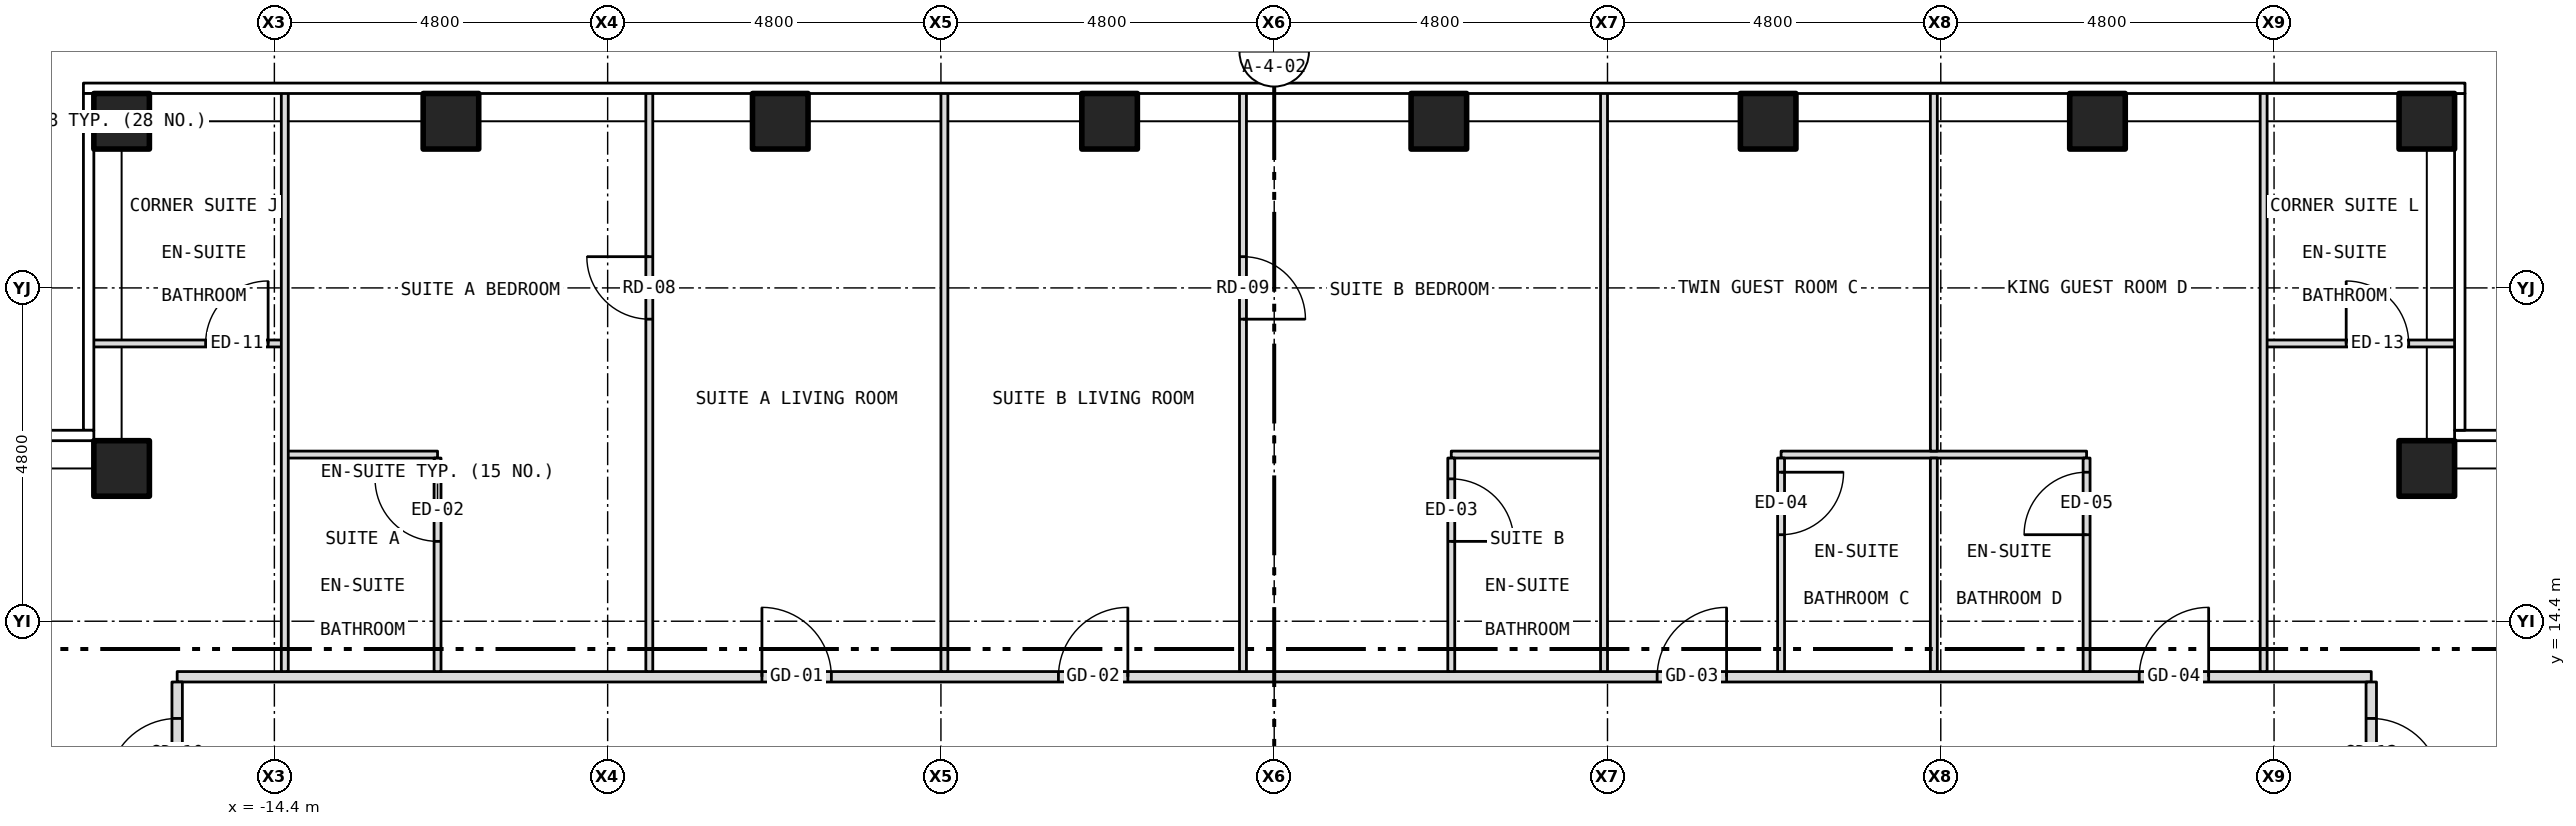
"""IFC4 building model, lengths in metres.
Left out: names, types, materials, properties, quantities, classifications, styles, units other than length and angle.
Written with IfcOpenShell. Run it as: python <this file> out.ifc"""

import sys

from ifc_helpers import new_model, si_unit, direction, frame, frame_2d, origin, origin_2d, place, context, subcontext, project, spatial, rectangle, hollow_rectangle, extrude, element, fill, save


model = new_model("IFC4")
c1 = context("Model", 3, precision=1e-05, world=origin(), true_north=direction((0.0, 1.0)))
c2 = subcontext(c1, "Body", "Model", "MODEL_VIEW")
j1 = project(units=[si_unit("LENGTHUNIT", "METRE"), si_unit("PLANEANGLEUNIT", "RADIAN")], contexts=[c1])
p1 = place(None, origin())
s1 = spatial("IfcSite", under=j1, at=p1, CompositionType="ELEMENT")
p2 = place(p1, origin())
s2 = spatial("IfcBuilding", under=s1, at=p2, CompositionType="ELEMENT")
p3 = place(p2, frame((0.0, 0.0, 155.0)))
s3 = spatial("IfcBuildingStorey", under=s2, at=p3, CompositionType="ELEMENT", Elevation=155.0)
for number, where, z_axis, x_axis in (
    (1, (-16.6, 21.6, -0.15), (0.0, 0.0, 1.0), (1.0, 0.0, 0.0)),
    (2, (-11.857, 21.6, -0.15), (0.0, 0.0, 1.0), (1.0, 0.0, 0.0)),
    (3, (-7.114, 21.6, -0.15), (0.0, 0.0, 1.0), (1.0, 0.0, 0.0)),
    (4, (-2.371, 21.6, -0.15), (0.0, 0.0, 1.0), (1.0, 0.0, 0.0)),
    (5, (2.371, 21.6, -0.15), (0.0, 0.0, 1.0), (1.0, 0.0, 0.0)),
    (6, (7.114, 21.6, -0.15), (0.0, 0.0, 1.0), (1.0, 0.0, 0.0)),
    (7, (11.857, 21.6, -0.15), (0.0, 0.0, 1.0), (1.0, 0.0, 0.0)),
    (8, (16.6, 21.6, -0.15), (0.0, 0.0, 1.0), (1.0, 0.0, 0.0)),
    (9, (-16.6, 16.6, -0.15), (0.0, 0.0, 1.0), (1.0, 0.0, 0.0)),
    (10, (16.6, 16.6, -0.15), (0.0, 0.0, 1.0), (1.0, 0.0, 0.0)),
):
    element("IfcColumn", number, at=place(p3, frame(where, z_axis=z_axis, x_axis=x_axis)), inside=s3, PredefinedType="COLUMN", context=c2, shape_type="SweptSolid", body=[
        extrude(hollow_rectangle(XDim=0.8, YDim=0.8, WallThickness=0.045, at=origin_2d()), origin(), (0.0, 0.0, 1.0), 3.5),
    ])
p4 = place(p3, frame((-15.8, 13.6, 0.0), z_axis=(0.0, 0.0, 1.0), x_axis=(1.0, 0.0, 0.0)))
e11 = element("IfcWall", 11, at=p4, inside=s3, PredefinedType="PARTITIONING", context=c2, shape_type="SweptSolid", body=[
    extrude(rectangle(XDim=31.6, YDim=0.15, at=frame_2d((15.8, 0.0))), origin(), (0.0, 0.0, 1.0), 3.35),
])
p5 = place(p4, frame((8.422, 0.0, 0.0)))
e12 = element("IfcOpeningElement", 12, at=p5, cuts=e11, PredefinedType="OPENING", context=c2, shape_type="SweptSolid", body=[
    extrude(rectangle(XDim=1.0, YDim=2.1, at=frame_2d((0.5, 1.05))), frame((0.0, 0.087, 0.0), z_axis=(0.0, -1.0, 0.0), x_axis=(1.0, 0.0, 0.0)), (0.0, 0.0, 1.0), 0.174),
])
p6 = place(p4, frame((12.692, 0.0, 0.0)))
e13 = element("IfcOpeningElement", 13, at=p6, cuts=e11, PredefinedType="OPENING", context=c2, shape_type="SweptSolid", body=[
    extrude(rectangle(XDim=1.0, YDim=2.1, at=frame_2d((0.5, 1.05))), frame((0.0, 0.087, 0.0), z_axis=(0.0, -1.0, 0.0), x_axis=(1.0, 0.0, 0.0)), (0.0, 0.0, 1.0), 0.174),
])
p7 = place(p4, frame((21.315, 0.0, 0.0)))
e14 = element("IfcOpeningElement", 14, at=p7, cuts=e11, PredefinedType="OPENING", context=c2, shape_type="SweptSolid", body=[
    extrude(rectangle(XDim=1.0, YDim=2.1, at=frame_2d((0.5, 1.05))), frame((0.0, 0.087, 0.0), z_axis=(0.0, -1.0, 0.0), x_axis=(1.0, 0.0, 0.0)), (0.0, 0.0, 1.0), 0.174),
])
p8 = place(p4, frame((28.258, 0.0, 0.0)))
e15 = element("IfcOpeningElement", 15, at=p8, cuts=e11, PredefinedType="OPENING", context=c2, shape_type="SweptSolid", body=[
    extrude(rectangle(XDim=1.0, YDim=2.1, at=frame_2d((0.5, 1.05))), frame((0.0, 0.087, 0.0), z_axis=(0.0, -1.0, 0.0), x_axis=(1.0, 0.0, 0.0)), (0.0, 0.0, 1.0), 0.174),
])
for number, where, z_axis, x_axis in (
    (16, (-14.25, 16.8, 0.0), (0.0, 0.0, 1.0), (1.0, 0.0, 0.0)),
    (17, (2.55, 16.8, 0.0), (0.0, 0.0, 1.0), (1.0, 0.0, 0.0)),
):
    element("IfcWall", number, at=place(p3, frame(where, z_axis=z_axis, x_axis=x_axis)), inside=s3, PredefinedType="PARTITIONING", context=c2, shape_type="SweptSolid", body=[
        extrude(rectangle(XDim=2.2, YDim=0.1, at=frame_2d((1.1, 0.0))), origin(), (0.0, 0.0, 1.0), 3.35),
    ])
p9 = place(p3, frame((7.3, 16.8, 0.0), z_axis=(0.0, 0.0, 1.0), x_axis=(1.0, 0.0, 0.0)))
e18 = element("IfcWall", 18, at=p9, inside=s3, PredefinedType="PARTITIONING", context=c2, shape_type="SweptSolid", body=[
    extrude(rectangle(XDim=4.4, YDim=0.1, at=frame_2d((2.2, 0.0))), origin(), (0.0, 0.0, 1.0), 3.35),
])
p10 = place(p3, frame((-17.03, 18.4, 0.0), z_axis=(0.0, 0.0, 1.0), x_axis=(1.0, 0.0, 0.0)))
e19 = element("IfcWall", 19, at=p10, inside=s3, PredefinedType="PARTITIONING", context=c2, shape_type="SweptSolid", body=[
    extrude(rectangle(XDim=2.78, YDim=0.1, at=frame_2d((1.39, 0.0))), origin(), (0.0, 0.0, 1.0), 3.35),
])
p11 = place(p10, frame((1.64, 0.0, 0.0)))
e20 = element("IfcOpeningElement", 20, at=p11, cuts=e19, PredefinedType="OPENING", context=c2, shape_type="SweptSolid", body=[
    extrude(rectangle(XDim=0.9, YDim=2.1, at=frame_2d((0.45, 1.05))), frame((0.0, 0.062, 0.0), z_axis=(0.0, -1.0, 0.0), x_axis=(1.0, 0.0, 0.0)), (0.0, 0.0, 1.0), 0.124),
])
p12 = place(p3, frame((14.25, 18.4, 0.0), z_axis=(0.0, 0.0, 1.0), x_axis=(1.0, 0.0, 0.0)))
e21 = element("IfcWall", 21, at=p12, inside=s3, PredefinedType="PARTITIONING", context=c2, shape_type="SweptSolid", body=[
    extrude(rectangle(XDim=2.78, YDim=0.1, at=frame_2d((1.39, 0.0))), origin(), (0.0, 0.0, 1.0), 3.35),
])
p13 = place(p12, frame((1.189, 0.0, 0.0)))
e22 = element("IfcOpeningElement", 22, at=p13, cuts=e21, PredefinedType="OPENING", context=c2, shape_type="SweptSolid", body=[
    extrude(rectangle(XDim=0.9, YDim=2.1, at=frame_2d((0.45, 1.05))), frame((0.0, 0.062, 0.0), z_axis=(0.0, -1.0, 0.0), x_axis=(1.0, 0.0, 0.0)), (0.0, 0.0, 1.0), 0.124),
])
p14 = place(p3, frame((-15.8, 10.92, 0.0), z_axis=(0.0, 0.0, 1.0), x_axis=(0.0, 1.0, 0.0)))
e23 = element("IfcWall", 23, at=p14, inside=s3, PredefinedType="PARTITIONING", context=c2, shape_type="SweptSolid", body=[
    extrude(rectangle(XDim=2.605, YDim=0.15, at=frame_2d((1.302, 0.0))), origin(), (0.0, 0.0, 1.0), 3.35),
])
p15 = place(p14, frame((1.08, 0.0, 0.0)))
e24 = element("IfcOpeningElement", 24, at=p15, cuts=e23, PredefinedType="OPENING", context=c2, shape_type="SweptSolid", body=[
    extrude(rectangle(XDim=1.0, YDim=2.1, at=frame_2d((0.5, 1.05))), frame((0.0, 0.087, 0.0), z_axis=(0.0, -1.0, 0.0), x_axis=(1.0, 0.0, 0.0)), (0.0, 0.0, 1.0), 0.174),
])
p16 = place(p3, frame((-14.25, 13.675, 0.0), z_axis=(0.0, 0.0, 1.0), x_axis=(0.0, 1.0, 0.0)))
e25 = element("IfcWall", 25, at=p16, inside=s3, PredefinedType="PARTITIONING", context=c2, shape_type="SweptSolid", body=[
    extrude(rectangle(XDim=8.355, YDim=0.1, at=frame_2d((4.177, 0.0))), origin(), (0.0, 0.0, 1.0), 2.817),
])
p17 = place(p3, frame((-12.05, 13.675, 0.0), z_axis=(0.0, 0.0, 1.0), x_axis=(0.0, 1.0, 0.0)))
e26 = element("IfcWall", 26, at=p17, inside=s3, PredefinedType="PARTITIONING", context=c2, shape_type="SweptSolid", body=[
    extrude(rectangle(XDim=3.075, YDim=0.1, at=frame_2d((1.538, 0.0))), origin(), (0.0, 0.0, 1.0), 3.35),
])
p18 = place(p17, frame((1.875, 0.0, 0.0)))
e27 = element("IfcOpeningElement", 27, at=p18, cuts=e26, PredefinedType="OPENING", context=c2, shape_type="SweptSolid", body=[
    extrude(rectangle(XDim=0.9, YDim=2.1, at=frame_2d((0.45, 1.05))), frame((0.0, 0.062, 0.0), z_axis=(0.0, -1.0, 0.0), x_axis=(1.0, 0.0, 0.0)), (0.0, 0.0, 1.0), 0.124),
])
p19 = place(p3, frame((-9.0, 13.675, 0.0), z_axis=(0.0, 0.0, 1.0), x_axis=(0.0, 1.0, 0.0)))
e28 = element("IfcWall", 28, at=p19, inside=s3, PredefinedType="PARTITIONING", context=c2, shape_type="SweptSolid", body=[
    extrude(rectangle(XDim=8.355, YDim=0.1, at=frame_2d((4.177, 0.0))), origin(), (0.0, 0.0, 1.0), 3.35),
])
p20 = place(p19, frame((5.075, 0.0, 0.0)))
e29 = element("IfcOpeningElement", 29, at=p20, cuts=e28, PredefinedType="OPENING", context=c2, shape_type="SweptSolid", body=[
    extrude(rectangle(XDim=0.9, YDim=2.1, at=frame_2d((0.45, 1.05))), frame((0.0, 0.062, 0.0), z_axis=(0.0, -1.0, 0.0), x_axis=(1.0, 0.0, 0.0)), (0.0, 0.0, 1.0), 0.124),
])
p21 = place(p3, frame((-4.75, 13.675, 0.0), z_axis=(0.0, 0.0, 1.0), x_axis=(0.0, 1.0, 0.0)))
e30 = element("IfcWall", 30, at=p21, inside=s3, PredefinedType="PARTITIONING", context=c2, shape_type="SweptSolid", body=[
    extrude(rectangle(XDim=8.355, YDim=0.1, at=frame_2d((4.177, 0.0))), origin(), (0.0, 0.0, 1.0), 2.817),
])
p22 = place(p3, frame((-0.45, 13.675, 0.0), z_axis=(0.0, 0.0, 1.0), x_axis=(0.0, 1.0, 0.0)))
e31 = element("IfcWall", 31, at=p22, inside=s3, PredefinedType="PARTITIONING", context=c2, shape_type="SweptSolid", body=[
    extrude(rectangle(XDim=8.355, YDim=0.1, at=frame_2d((4.177, 0.0))), origin(), (0.0, 0.0, 1.0), 3.35),
])
p23 = place(p22, frame((5.075, 0.0, 0.0)))
e32 = element("IfcOpeningElement", 32, at=p23, cuts=e31, PredefinedType="OPENING", context=c2, shape_type="SweptSolid", body=[
    extrude(rectangle(XDim=0.9, YDim=2.1, at=frame_2d((0.45, 1.05))), frame((0.0, 0.062, 0.0), z_axis=(0.0, -1.0, 0.0), x_axis=(1.0, 0.0, 0.0)), (0.0, 0.0, 1.0), 0.124),
])
p24 = place(p3, frame((2.55, 13.675, 0.0), z_axis=(0.0, 0.0, 1.0), x_axis=(0.0, 1.0, 0.0)))
e33 = element("IfcWall", 33, at=p24, inside=s3, PredefinedType="PARTITIONING", context=c2, shape_type="SweptSolid", body=[
    extrude(rectangle(XDim=3.075, YDim=0.1, at=frame_2d((1.538, 0.0))), origin(), (0.0, 0.0, 1.0), 3.35),
])
p25 = place(p24, frame((1.875, 0.0, 0.0)))
e34 = element("IfcOpeningElement", 34, at=p25, cuts=e33, PredefinedType="OPENING", context=c2, shape_type="SweptSolid", body=[
    extrude(rectangle(XDim=0.9, YDim=2.1, at=frame_2d((0.45, 1.05))), frame((0.0, 0.062, 0.0), z_axis=(0.0, -1.0, 0.0), x_axis=(1.0, 0.0, 0.0)), (0.0, 0.0, 1.0), 0.124),
])
p26 = place(p3, frame((4.75, 13.675, 0.0), z_axis=(0.0, 0.0, 1.0), x_axis=(0.0, 1.0, 0.0)))
e35 = element("IfcWall", 35, at=p26, inside=s3, PredefinedType="PARTITIONING", context=c2, shape_type="SweptSolid", body=[
    extrude(rectangle(XDim=8.355, YDim=0.1, at=frame_2d((4.177, 0.0))), origin(), (0.0, 0.0, 1.0), 2.817),
])
p27 = place(p3, frame((7.3, 13.675, 0.0), z_axis=(0.0, 0.0, 1.0), x_axis=(0.0, 1.0, 0.0)))
e36 = element("IfcWall", 36, at=p27, inside=s3, PredefinedType="PARTITIONING", context=c2, shape_type="SweptSolid", body=[
    extrude(rectangle(XDim=3.075, YDim=0.1, at=frame_2d((1.538, 0.0))), origin(), (0.0, 0.0, 1.0), 3.35),
])
p28 = place(p27, frame((1.971, 0.0, 0.0)))
e37 = element("IfcOpeningElement", 37, at=p28, cuts=e36, PredefinedType="OPENING", context=c2, shape_type="SweptSolid", body=[
    extrude(rectangle(XDim=0.9, YDim=2.1, at=frame_2d((0.45, 1.05))), frame((0.0, 0.062, 0.0), z_axis=(0.0, -1.0, 0.0), x_axis=(1.0, 0.0, 0.0)), (0.0, 0.0, 1.0), 0.124),
])
p29 = place(p3, frame((9.5, 13.675, 0.0), z_axis=(0.0, 0.0, 1.0), x_axis=(0.0, 1.0, 0.0)))
e38 = element("IfcWall", 38, at=p29, inside=s3, PredefinedType="PARTITIONING", context=c2, shape_type="SweptSolid", body=[
    extrude(rectangle(XDim=3.075, YDim=0.1, at=frame_2d((1.538, 0.0))), origin(), (0.0, 0.0, 1.0), 2.728),
])
p30 = place(p3, frame((9.5, 16.85, 0.0), z_axis=(0.0, 0.0, 1.0), x_axis=(0.0, 1.0, 0.0)))
e39 = element("IfcWall", 39, at=p30, inside=s3, PredefinedType="PARTITIONING", context=c2, shape_type="SweptSolid", body=[
    extrude(rectangle(XDim=5.18, YDim=0.1, at=frame_2d((2.59, 0.0))), origin(), (0.0, 0.0, 1.0), 2.728),
])
p31 = place(p3, frame((11.7, 13.675, 0.0), z_axis=(0.0, 0.0, 1.0), x_axis=(0.0, 1.0, 0.0)))
e40 = element("IfcWall", 40, at=p31, inside=s3, PredefinedType="PARTITIONING", context=c2, shape_type="SweptSolid", body=[
    extrude(rectangle(XDim=3.075, YDim=0.1, at=frame_2d((1.538, 0.0))), origin(), (0.0, 0.0, 1.0), 3.35),
])
p32 = place(p31, frame((1.971, 0.0, 0.0)))
e41 = element("IfcOpeningElement", 41, at=p32, cuts=e40, PredefinedType="OPENING", context=c2, shape_type="SweptSolid", body=[
    extrude(rectangle(XDim=0.9, YDim=2.1, at=frame_2d((0.45, 1.05))), frame((0.0, 0.062, 0.0), z_axis=(0.0, -1.0, 0.0), x_axis=(1.0, 0.0, 0.0)), (0.0, 0.0, 1.0), 0.124),
])
p33 = place(p3, frame((14.25, 13.675, 0.0), z_axis=(0.0, 0.0, 1.0), x_axis=(0.0, 1.0, 0.0)))
e42 = element("IfcWall", 42, at=p33, inside=s3, PredefinedType="PARTITIONING", context=c2, shape_type="SweptSolid", body=[
    extrude(rectangle(XDim=8.355, YDim=0.1, at=frame_2d((4.177, 0.0))), origin(), (0.0, 0.0, 1.0), 2.817),
])
p34 = place(p3, frame((15.8, 10.92, 0.0), z_axis=(0.0, 0.0, 1.0), x_axis=(0.0, 1.0, 0.0)))
e43 = element("IfcWall", 43, at=p34, inside=s3, PredefinedType="PARTITIONING", context=c2, shape_type="SweptSolid", body=[
    extrude(rectangle(XDim=2.605, YDim=0.15, at=frame_2d((1.302, 0.0))), origin(), (0.0, 0.0, 1.0), 3.35),
])
p35 = place(p34, frame((1.08, 0.0, 0.0)))
e44 = element("IfcOpeningElement", 44, at=p35, cuts=e43, PredefinedType="OPENING", context=c2, shape_type="SweptSolid", body=[
    extrude(rectangle(XDim=1.0, YDim=2.1, at=frame_2d((0.5, 1.05))), frame((0.0, 0.087, 0.0), z_axis=(0.0, -1.0, 0.0), x_axis=(1.0, 0.0, 0.0)), (0.0, 0.0, 1.0), 0.174),
])
p36 = place(p5, origin())
e45 = element("IfcDoor", 45, at=p36, inside=s3, OperationType="SINGLE_SWING_LEFT", PredefinedType="DOOR", context=c2, shape_type="SweptSolid", body=[
    extrude(rectangle(XDim=1.0, YDim=2.1, at=frame_2d((0.5, 1.05))), frame((0.0, 0.025, 0.0), z_axis=(0.0, -1.0, 0.0), x_axis=(1.0, 0.0, 0.0)), (0.0, 0.0, 1.0), 0.05),
])
fill(e12, e45)
p37 = place(p20, origin())
e46 = element("IfcDoor", 46, at=p37, inside=s3, OperationType="SINGLE_SWING_RIGHT", PredefinedType="DOOR", context=c2, shape_type="SweptSolid", body=[
    extrude(rectangle(XDim=0.9, YDim=2.1, at=frame_2d((0.45, 1.05))), frame((0.0, 0.025, 0.0), z_axis=(0.0, -1.0, 0.0), x_axis=(1.0, 0.0, 0.0)), (0.0, 0.0, 1.0), 0.05),
])
fill(e29, e46)
p38 = place(p18, origin())
e47 = element("IfcDoor", 47, at=p38, inside=s3, OperationType="SINGLE_SWING_RIGHT", PredefinedType="DOOR", context=c2, shape_type="SweptSolid", body=[
    extrude(rectangle(XDim=0.9, YDim=2.1, at=frame_2d((0.45, 1.05))), frame((0.0, 0.025, 0.0), z_axis=(0.0, -1.0, 0.0), x_axis=(1.0, 0.0, 0.0)), (0.0, 0.0, 1.0), 0.05),
])
fill(e27, e47)
p39 = place(p6, origin())
e48 = element("IfcDoor", 48, at=p39, inside=s3, OperationType="SINGLE_SWING_RIGHT", PredefinedType="DOOR", context=c2, shape_type="SweptSolid", body=[
    extrude(rectangle(XDim=1.0, YDim=2.1, at=frame_2d((0.5, 1.05))), frame((0.0, 0.025, 0.0), z_axis=(0.0, -1.0, 0.0), x_axis=(1.0, 0.0, 0.0)), (0.0, 0.0, 1.0), 0.05),
])
fill(e13, e48)
p40 = place(p23, origin())
e49 = element("IfcDoor", 49, at=p40, inside=s3, OperationType="SINGLE_SWING_LEFT", PredefinedType="DOOR", context=c2, shape_type="SweptSolid", body=[
    extrude(rectangle(XDim=0.9, YDim=2.1, at=frame_2d((0.45, 1.05))), frame((0.0, 0.025, 0.0), z_axis=(0.0, -1.0, 0.0), x_axis=(1.0, 0.0, 0.0)), (0.0, 0.0, 1.0), 0.05),
])
fill(e32, e49)
p41 = place(p25, origin())
e50 = element("IfcDoor", 50, at=p41, inside=s3, OperationType="SINGLE_SWING_LEFT", PredefinedType="DOOR", context=c2, shape_type="SweptSolid", body=[
    extrude(rectangle(XDim=0.9, YDim=2.1, at=frame_2d((0.45, 1.05))), frame((0.0, 0.025, 0.0), z_axis=(0.0, -1.0, 0.0), x_axis=(1.0, 0.0, 0.0)), (0.0, 0.0, 1.0), 0.05),
])
fill(e34, e50)
p42 = place(p7, origin())
e51 = element("IfcDoor", 51, at=p42, inside=s3, OperationType="SINGLE_SWING_RIGHT", PredefinedType="DOOR", context=c2, shape_type="SweptSolid", body=[
    extrude(rectangle(XDim=1.0, YDim=2.1, at=frame_2d((0.5, 1.05))), frame((0.0, 0.025, 0.0), z_axis=(0.0, -1.0, 0.0), x_axis=(1.0, 0.0, 0.0)), (0.0, 0.0, 1.0), 0.05),
])
fill(e14, e51)
p43 = place(p28, origin())
e52 = element("IfcDoor", 52, at=p43, inside=s3, OperationType="SINGLE_SWING_RIGHT", PredefinedType="DOOR", context=c2, shape_type="SweptSolid", body=[
    extrude(rectangle(XDim=0.9, YDim=2.1, at=frame_2d((0.45, 1.05))), frame((0.0, 0.025, 0.0), z_axis=(0.0, -1.0, 0.0), x_axis=(1.0, 0.0, 0.0)), (0.0, 0.0, 1.0), 0.05),
])
fill(e37, e52)
p44 = place(p8, origin())
e53 = element("IfcDoor", 53, at=p44, inside=s3, OperationType="SINGLE_SWING_RIGHT", PredefinedType="DOOR", context=c2, shape_type="SweptSolid", body=[
    extrude(rectangle(XDim=1.0, YDim=2.1, at=frame_2d((0.5, 1.05))), frame((0.0, 0.025, 0.0), z_axis=(0.0, -1.0, 0.0), x_axis=(1.0, 0.0, 0.0)), (0.0, 0.0, 1.0), 0.05),
])
fill(e15, e53)
p45 = place(p32, origin())
e54 = element("IfcDoor", 54, at=p45, inside=s3, OperationType="SINGLE_SWING_LEFT", PredefinedType="DOOR", context=c2, shape_type="SweptSolid", body=[
    extrude(rectangle(XDim=0.9, YDim=2.1, at=frame_2d((0.45, 1.05))), frame((0.0, 0.025, 0.0), z_axis=(0.0, -1.0, 0.0), x_axis=(1.0, 0.0, 0.0)), (0.0, 0.0, 1.0), 0.05),
])
fill(e41, e54)
p46 = place(p11, origin())
e55 = element("IfcDoor", 55, at=p46, inside=s3, OperationType="SINGLE_SWING_RIGHT", PredefinedType="DOOR", context=c2, shape_type="SweptSolid", body=[
    extrude(rectangle(XDim=0.9, YDim=2.1, at=frame_2d((0.45, 1.05))), frame((0.0, 0.025, 0.0), z_axis=(0.0, -1.0, 0.0), x_axis=(1.0, 0.0, 0.0)), (0.0, 0.0, 1.0), 0.05),
])
fill(e20, e55)
p47 = place(p15, origin())
e56 = element("IfcDoor", 56, at=p47, inside=s3, OperationType="SINGLE_SWING_LEFT", PredefinedType="DOOR", context=c2, shape_type="SweptSolid", body=[
    extrude(rectangle(XDim=1.0, YDim=2.1, at=frame_2d((0.5, 1.05))), frame((0.0, 0.025, 0.0), z_axis=(0.0, -1.0, 0.0), x_axis=(1.0, 0.0, 0.0)), (0.0, 0.0, 1.0), 0.05),
])
fill(e24, e56)
p48 = place(p13, origin())
e57 = element("IfcDoor", 57, at=p48, inside=s3, OperationType="SINGLE_SWING_LEFT", PredefinedType="DOOR", context=c2, shape_type="SweptSolid", body=[
    extrude(rectangle(XDim=0.9, YDim=2.1, at=frame_2d((0.45, 1.05))), frame((0.0, 0.025, 0.0), z_axis=(0.0, -1.0, 0.0), x_axis=(1.0, 0.0, 0.0)), (0.0, 0.0, 1.0), 0.05),
])
fill(e22, e57)
p49 = place(p35, origin())
e58 = element("IfcDoor", 58, at=p49, inside=s3, OperationType="SINGLE_SWING_LEFT", PredefinedType="DOOR", context=c2, shape_type="SweptSolid", body=[
    extrude(rectangle(XDim=1.0, YDim=2.1, at=frame_2d((0.5, 1.05))), frame((0.0, 0.025, 0.0), z_axis=(0.0, -1.0, 0.0), x_axis=(1.0, 0.0, 0.0)), (0.0, 0.0, 1.0), 0.05),
])
fill(e44, e58)
save(model, sys.argv[1])
